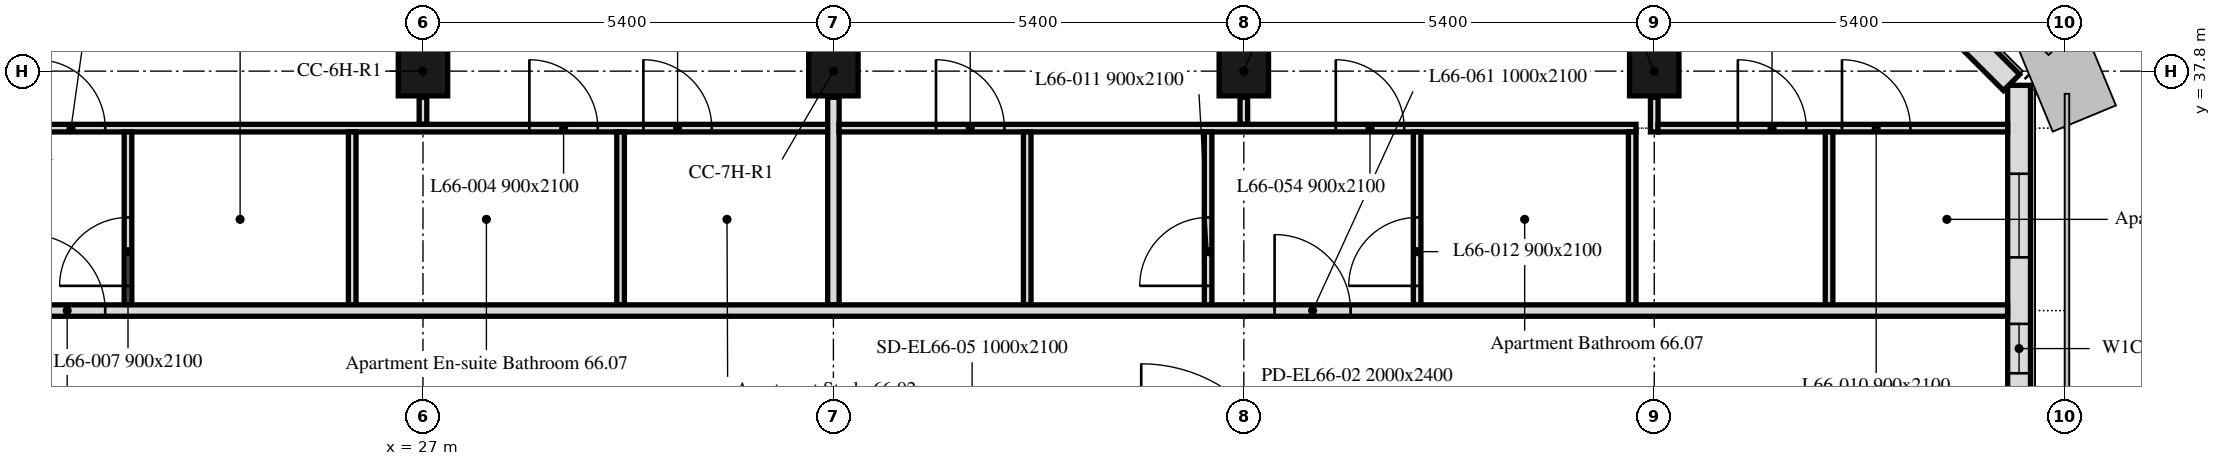
"""IFC4 building model, lengths in metres.
Left out: names, types, materials, properties, quantities, classifications, styles, units other than length and angle.
Written with IfcOpenShell. Run it as: python <this file> out.ifc"""

import sys

from ifc_helpers import new_model, si_unit, direction, frame, frame_2d, origin, origin_2d, place, context, subcontext, project, spatial, rectangle, extrude, element, fill, save


model = new_model("IFC4")
c1 = context("Model", 3, precision=1e-05, world=origin(), true_north=direction((0.0, 1.0)))
c2 = subcontext(c1, "Body", "Model", "MODEL_VIEW")
j1 = project(units=[si_unit("LENGTHUNIT", "METRE"), si_unit("PLANEANGLEUNIT", "RADIAN")], contexts=[c1])
p1 = place(None, origin())
s1 = spatial("IfcSite", under=j1, at=p1, CompositionType="ELEMENT")
p2 = place(p1, origin())
s2 = spatial("IfcBuilding", under=s1, at=p2, CompositionType="ELEMENT")
p3 = place(p2, frame((0.0, 0.0, 271.9)))
s3 = spatial("IfcBuildingStorey", under=s2, at=p3, CompositionType="ELEMENT", Elevation=271.9)
for number, where, z_axis, x_axis in (
    (1, (27.0, 37.8, 0.0), (0.0, 0.0, 1.0), (1.0, 0.0, 0.0)),
    (2, (32.4, 37.8, 0.0), (0.0, 0.0, 1.0), (1.0, 0.0, 0.0)),
    (3, (37.8, 37.8, 0.0), (0.0, 0.0, 1.0), (1.0, 0.0, 0.0)),
    (4, (43.2, 37.8, 0.0), (0.0, 0.0, 1.0), (1.0, 0.0, 0.0)),
):
    element("IfcColumn", number, at=place(p3, frame(where, z_axis=z_axis, x_axis=x_axis)), inside=s3, PredefinedType="COLUMN", context=c2, shape_type="SweptSolid", body=[
        extrude(rectangle(XDim=0.65, YDim=0.65, at=origin_2d()), origin(), (0.0, 0.0, 1.0), 3.0),
    ])
p4 = place(p3, frame((48.0, 5.586, 0.0), z_axis=(0.0, 0.0, 1.0), x_axis=(0.0, 1.0, 0.0)))
e5 = element("IfcWall", 5, at=p4, inside=s3, PredefinedType="SOLIDWALL", context=c2, shape_type="SweptSolid", body=[
    extrude(rectangle(XDim=32.027, YDim=0.3, at=frame_2d((16.014, 0.0))), origin(), (0.0, 0.0, 1.0), 3.0),
])
p5 = place(p4, frame((1.314, 0.0, 0.9)))
e6 = element("IfcOpeningElement", 6, at=p5, cuts=e5, PredefinedType="OPENING", context=c2, shape_type="SweptSolid", body=[
    extrude(rectangle(XDim=1.1, YDim=1.7, at=frame_2d((0.55, 0.85))), frame((0.0, 0.16, 0.0), z_axis=(0.0, -1.0, 0.0), x_axis=(1.0, 0.0, 0.0)), (0.0, 0.0, 1.0), 0.32),
])
p6 = place(p4, frame((2.764, 0.0, 0.9)))
e7 = element("IfcOpeningElement", 7, at=p6, cuts=e5, PredefinedType="OPENING", context=c2, shape_type="SweptSolid", body=[
    extrude(rectangle(XDim=1.1, YDim=1.7, at=frame_2d((0.55, 0.85))), frame((0.0, 0.16, 0.0), z_axis=(0.0, -1.0, 0.0), x_axis=(1.0, 0.0, 0.0)), (0.0, 0.0, 1.0), 0.32),
])
p7 = place(p4, frame((6.564, 0.0, 0.9)))
e8 = element("IfcOpeningElement", 8, at=p7, cuts=e5, PredefinedType="OPENING", context=c2, shape_type="SweptSolid", body=[
    extrude(rectangle(XDim=1.1, YDim=1.7, at=frame_2d((0.55, 0.85))), frame((0.0, 0.16, 0.0), z_axis=(0.0, -1.0, 0.0), x_axis=(1.0, 0.0, 0.0)), (0.0, 0.0, 1.0), 0.32),
])
p8 = place(p4, frame((8.514, 0.0, 0.9)))
e9 = element("IfcOpeningElement", 9, at=p8, cuts=e5, PredefinedType="OPENING", context=c2, shape_type="SweptSolid", body=[
    extrude(rectangle(XDim=1.1, YDim=1.7, at=frame_2d((0.55, 0.85))), frame((0.0, 0.16, 0.0), z_axis=(0.0, -1.0, 0.0), x_axis=(1.0, 0.0, 0.0)), (0.0, 0.0, 1.0), 0.32),
])
p9 = place(p4, frame((11.614, 0.0, 0.9)))
e10 = element("IfcOpeningElement", 10, at=p9, cuts=e5, PredefinedType="OPENING", context=c2, shape_type="SweptSolid", body=[
    extrude(rectangle(XDim=3.4, YDim=1.7, at=frame_2d((1.7, 0.85))), frame((0.0, 0.16, 0.0), z_axis=(0.0, -1.0, 0.0), x_axis=(1.0, 0.0, 0.0)), (0.0, 0.0, 1.0), 0.32),
])
p10 = place(p4, frame((17.364, 0.0, 0.9)))
e11 = element("IfcOpeningElement", 11, at=p10, cuts=e5, PredefinedType="OPENING", context=c2, shape_type="SweptSolid", body=[
    extrude(rectangle(XDim=1.1, YDim=1.7, at=frame_2d((0.55, 0.85))), frame((0.0, 0.16, 0.0), z_axis=(0.0, -1.0, 0.0), x_axis=(1.0, 0.0, 0.0)), (0.0, 0.0, 1.0), 0.32),
])
p11 = place(p4, frame((18.964, 0.0, 0.9)))
e12 = element("IfcOpeningElement", 12, at=p11, cuts=e5, PredefinedType="OPENING", context=c2, shape_type="SweptSolid", body=[
    extrude(rectangle(XDim=1.1, YDim=1.7, at=frame_2d((0.55, 0.85))), frame((0.0, 0.16, 0.0), z_axis=(0.0, -1.0, 0.0), x_axis=(1.0, 0.0, 0.0)), (0.0, 0.0, 1.0), 0.32),
])
p12 = place(p4, frame((22.414, 0.0, 0.9)))
e13 = element("IfcOpeningElement", 13, at=p12, cuts=e5, PredefinedType="OPENING", context=c2, shape_type="SweptSolid", body=[
    extrude(rectangle(XDim=3.4, YDim=1.7, at=frame_2d((1.7, 0.85))), frame((0.0, 0.16, 0.0), z_axis=(0.0, -1.0, 0.0), x_axis=(1.0, 0.0, 0.0)), (0.0, 0.0, 1.0), 0.32),
])
p13 = place(p4, frame((28.239, 0.0, 0.9)))
e14 = element("IfcOpeningElement", 14, at=p13, cuts=e5, PredefinedType="OPENING", context=c2, shape_type="SweptSolid", body=[
    extrude(rectangle(XDim=0.65, YDim=1.7, at=frame_2d((0.325, 0.85))), frame((0.0, 0.16, 0.0), z_axis=(0.0, -1.0, 0.0), x_axis=(1.0, 0.0, 0.0)), (0.0, 0.0, 1.0), 0.32),
])
p14 = place(p4, frame((29.764, 0.0, 0.9)))
e15 = element("IfcOpeningElement", 15, at=p14, cuts=e5, PredefinedType="OPENING", context=c2, shape_type="SweptSolid", body=[
    extrude(rectangle(XDim=1.1, YDim=1.7, at=frame_2d((0.55, 0.85))), frame((0.0, 0.16, 0.0), z_axis=(0.0, -1.0, 0.0), x_axis=(1.0, 0.0, 0.0)), (0.0, 0.0, 1.0), 0.32),
])
p15 = place(p3, frame((47.901, 37.65, 0.0), z_axis=(0.0, 0.0, 1.0), x_axis=(-0.707106781187, 0.707106781187, 0.0)))
e16 = element("IfcWall", 16, at=p15, inside=s3, PredefinedType="SOLIDWALL", context=c2, shape_type="SweptSolid", body=[
    extrude(rectangle(XDim=6.86, YDim=0.3, at=frame_2d((3.43, 0.0))), origin(), (0.0, 0.0, 1.0), 3.0),
])
p16 = place(p15, frame((1.73, 0.0, 0.9)))
e17 = element("IfcOpeningElement", 17, at=p16, cuts=e16, PredefinedType="OPENING", context=c2, shape_type="SweptSolid", body=[
    extrude(rectangle(XDim=3.4, YDim=1.7, at=frame_2d((1.7, 0.85))), frame((0.0, 0.16, 0.0), z_axis=(0.0, -1.0, 0.0), x_axis=(1.0, 0.0, 0.0)), (0.0, 0.0, 1.0), 0.32),
])
p17 = place(p3, frame((27.0, 37.1, 0.0), z_axis=(0.0, 0.0, 1.0), x_axis=(0.0, 1.0, 0.0)))
e18 = element("IfcWall", 18, at=p17, inside=s3, PredefinedType="PARTITIONING", context=c2, shape_type="SweptSolid", body=[
    extrude(rectangle(XDim=0.355, YDim=0.1, at=frame_2d((0.177, 0.0))), origin(), (0.0, 0.0, 1.0), 3.0),
])
p18 = place(p3, frame((16.275, 37.05, 0.0), z_axis=(0.0, 0.0, 1.0), x_axis=(1.0, 0.0, 0.0)))
e19 = element("IfcWall", 19, at=p18, inside=s3, PredefinedType="PARTITIONING", context=c2, shape_type="SweptSolid", body=[
    extrude(rectangle(XDim=16.05, YDim=0.1, at=frame_2d((8.025, 0.0))), origin(), (0.0, 0.0, 1.0), 3.0),
])
p19 = place(p18, frame((1.453, 0.0, 0.0)))
e20 = element("IfcOpeningElement", 20, at=p19, cuts=e19, PredefinedType="OPENING", context=c2, shape_type="SweptSolid", body=[
    extrude(rectangle(XDim=0.9, YDim=2.1, at=frame_2d((0.45, 1.05))), frame((0.0, 0.05, 0.0), z_axis=(0.0, -1.0, 0.0), x_axis=(1.0, 0.0, 0.0)), (0.0, 0.0, 1.0), 0.1),
])
p20 = place(p18, frame((12.125, 0.0, 0.0)))
e21 = element("IfcOpeningElement", 21, at=p20, cuts=e19, PredefinedType="OPENING", context=c2, shape_type="SweptSolid", body=[
    extrude(rectangle(XDim=0.9, YDim=2.1, at=frame_2d((0.45, 1.05))), frame((0.0, 0.05, 0.0), z_axis=(0.0, -1.0, 0.0), x_axis=(1.0, 0.0, 0.0)), (0.0, 0.0, 1.0), 0.1),
])
p21 = place(p18, frame((13.625, 0.0, 0.0)))
e22 = element("IfcOpeningElement", 22, at=p21, cuts=e19, PredefinedType="OPENING", context=c2, shape_type="SweptSolid", body=[
    extrude(rectangle(XDim=0.9, YDim=2.1, at=frame_2d((0.45, 1.05))), frame((0.0, 0.05, 0.0), z_axis=(0.0, -1.0, 0.0), x_axis=(1.0, 0.0, 0.0)), (0.0, 0.0, 1.0), 0.1),
])
p22 = place(p18, frame((5.644, 0.0, 0.0)))
e23 = element("IfcOpeningElement", 23, at=p22, cuts=e19, PredefinedType="OPENING", context=c2, shape_type="SweptSolid", body=[
    extrude(rectangle(XDim=0.9, YDim=2.1, at=frame_2d((0.45, 1.05))), frame((0.0, 0.05, 0.0), z_axis=(0.0, -1.0, 0.0), x_axis=(1.0, 0.0, 0.0)), (0.0, 0.0, 1.0), 0.1),
])
p23 = place(p3, frame((23.119, 34.725, 0.0), z_axis=(0.0, 0.0, 1.0), x_axis=(0.0, 1.0, 0.0)))
e24 = element("IfcWall", 24, at=p23, inside=s3, PredefinedType="PARTITIONING", context=c2, shape_type="SweptSolid", body=[
    extrude(rectangle(XDim=2.275, YDim=0.1, at=frame_2d((1.137, 0.0))), origin(), (0.0, 0.0, 1.0), 3.0),
])
p24 = place(p23, frame((0.25, 0.0, 0.0)))
e25 = element("IfcOpeningElement", 25, at=p24, cuts=e24, PredefinedType="OPENING", context=c2, shape_type="SweptSolid", body=[
    extrude(rectangle(XDim=0.9, YDim=2.1, at=frame_2d((0.45, 1.05))), frame((0.0, 0.05, 0.0), z_axis=(0.0, -1.0, 0.0), x_axis=(1.0, 0.0, 0.0)), (0.0, 0.0, 1.0), 0.1),
])
for number, where, z_axis, x_axis in (
    (26, (26.069, 34.725, 0.0), (0.0, 0.0, 1.0), (0.0, 1.0, 0.0)),
    (27, (29.6, 34.725, 0.0), (0.0, 0.0, 1.0), (0.0, 1.0, 0.0)),
):
    element("IfcWall", number, at=place(p3, frame(where, z_axis=z_axis, x_axis=x_axis)), inside=s3, PredefinedType="PARTITIONING", context=c2, shape_type="SweptSolid", body=[
        extrude(rectangle(XDim=2.275, YDim=0.1, at=frame_2d((1.137, 0.0))), origin(), (0.0, 0.0, 1.0), 3.0),
    ])
p25 = place(p3, frame((32.4, 34.725, 0.0), z_axis=(0.0, 0.0, 1.0), x_axis=(0.0, 1.0, 0.0)))
e28 = element("IfcWall", 28, at=p25, inside=s3, PredefinedType="PARTITIONING", context=c2, shape_type="SweptSolid", body=[
    extrude(rectangle(XDim=2.73, YDim=0.15, at=frame_2d((1.365, 0.0))), origin(), (0.0, 0.0, 1.0), 3.0),
])
p26 = place(p3, frame((37.8, 37.1, 0.0), z_axis=(0.0, 0.0, 1.0), x_axis=(0.0, 1.0, 0.0)))
e29 = element("IfcWall", 29, at=p26, inside=s3, PredefinedType="PARTITIONING", context=c2, shape_type="SweptSolid", body=[
    extrude(rectangle(XDim=0.355, YDim=0.1, at=frame_2d((0.177, 0.0))), origin(), (0.0, 0.0, 1.0), 3.0),
])
p27 = place(p3, frame((32.475, 37.05, 0.0), z_axis=(0.0, 0.0, 1.0), x_axis=(1.0, 0.0, 0.0)))
e30 = element("IfcWall", 30, at=p27, inside=s3, PredefinedType="PARTITIONING", context=c2, shape_type="SweptSolid", body=[
    extrude(rectangle(XDim=10.485, YDim=0.1, at=frame_2d((5.242, 0.0))), origin(), (0.0, 0.0, 1.0), 3.0),
])
p28 = place(p27, frame((1.275, 0.0, 0.0)))
e31 = element("IfcOpeningElement", 31, at=p28, cuts=e30, PredefinedType="OPENING", context=c2, shape_type="SweptSolid", body=[
    extrude(rectangle(XDim=0.9, YDim=2.1, at=frame_2d((0.45, 1.05))), frame((0.0, 0.05, 0.0), z_axis=(0.0, -1.0, 0.0), x_axis=(1.0, 0.0, 0.0)), (0.0, 0.0, 1.0), 0.1),
])
p29 = place(p27, frame((6.535, 0.0, 0.0)))
e32 = element("IfcOpeningElement", 32, at=p29, cuts=e30, PredefinedType="OPENING", context=c2, shape_type="SweptSolid", body=[
    extrude(rectangle(XDim=0.9, YDim=2.1, at=frame_2d((0.45, 1.05))), frame((0.0, 0.05, 0.0), z_axis=(0.0, -1.0, 0.0), x_axis=(1.0, 0.0, 0.0)), (0.0, 0.0, 1.0), 0.1),
])
p30 = place(p3, frame((43.2, 37.0, 0.0), z_axis=(0.0, 0.0, 1.0), x_axis=(0.0, 1.0, 0.0)))
e33 = element("IfcWall", 33, at=p30, inside=s3, PredefinedType="PARTITIONING", context=c2, shape_type="SweptSolid", body=[
    extrude(rectangle(XDim=0.455, YDim=0.1, at=frame_2d((0.228, 0.0))), origin(), (0.0, 0.0, 1.0), 3.0),
])
p31 = place(p3, frame((43.25, 37.05, 0.0), z_axis=(0.0, 0.0, 1.0), x_axis=(1.0, 0.0, 0.0)))
e34 = element("IfcWall", 34, at=p31, inside=s3, PredefinedType="PARTITIONING", context=c2, shape_type="SweptSolid", body=[
    extrude(rectangle(XDim=4.599, YDim=0.1, at=frame_2d((2.3, 0.0))), origin(), (0.0, 0.0, 1.0), 3.0),
])
p32 = place(p31, frame((1.05, 0.0, 0.0)))
e35 = element("IfcOpeningElement", 35, at=p32, cuts=e34, PredefinedType="OPENING", context=c2, shape_type="SweptSolid", body=[
    extrude(rectangle(XDim=0.9, YDim=2.1, at=frame_2d((0.45, 1.05))), frame((0.0, 0.05, 0.0), z_axis=(0.0, -1.0, 0.0), x_axis=(1.0, 0.0, 0.0)), (0.0, 0.0, 1.0), 0.1),
])
p33 = place(p31, frame((2.42, 0.0, 0.0)))
e36 = element("IfcOpeningElement", 36, at=p33, cuts=e34, PredefinedType="OPENING", context=c2, shape_type="SweptSolid", body=[
    extrude(rectangle(XDim=0.9, YDim=2.1, at=frame_2d((0.45, 1.05))), frame((0.0, 0.05, 0.0), z_axis=(0.0, -1.0, 0.0), x_axis=(1.0, 0.0, 0.0)), (0.0, 0.0, 1.0), 0.1),
])
p34 = place(p3, frame((34.95, 34.725, 0.0), z_axis=(0.0, 0.0, 1.0), x_axis=(0.0, 1.0, 0.0)))
e37 = element("IfcWall", 37, at=p34, inside=s3, PredefinedType="PARTITIONING", context=c2, shape_type="SweptSolid", body=[
    extrude(rectangle(XDim=2.275, YDim=0.1, at=frame_2d((1.137, 0.0))), origin(), (0.0, 0.0, 1.0), 3.0),
])
p35 = place(p3, frame((37.33, 34.725, 0.0), z_axis=(0.0, 0.0, 1.0), x_axis=(0.0, 1.0, 0.0)))
e38 = element("IfcWall", 38, at=p35, inside=s3, PredefinedType="PARTITIONING", context=c2, shape_type="SweptSolid", body=[
    extrude(rectangle(XDim=2.275, YDim=0.1, at=frame_2d((1.137, 0.0))), origin(), (0.0, 0.0, 1.0), 3.0),
])
p36 = place(p35, frame((0.25, 0.0, 0.0)))
e39 = element("IfcOpeningElement", 39, at=p36, cuts=e38, PredefinedType="OPENING", context=c2, shape_type="SweptSolid", body=[
    extrude(rectangle(XDim=0.9, YDim=2.1, at=frame_2d((0.45, 1.05))), frame((0.0, 0.05, 0.0), z_axis=(0.0, -1.0, 0.0), x_axis=(1.0, 0.0, 0.0)), (0.0, 0.0, 1.0), 0.1),
])
p37 = place(p3, frame((40.08, 34.725, 0.0), z_axis=(0.0, 0.0, 1.0), x_axis=(0.0, 1.0, 0.0)))
e40 = element("IfcWall", 40, at=p37, inside=s3, PredefinedType="PARTITIONING", context=c2, shape_type="SweptSolid", body=[
    extrude(rectangle(XDim=2.275, YDim=0.1, at=frame_2d((1.137, 0.0))), origin(), (0.0, 0.0, 1.0), 3.0),
])
p38 = place(p37, frame((0.25, 0.0, 0.0)))
e41 = element("IfcOpeningElement", 41, at=p38, cuts=e40, PredefinedType="OPENING", context=c2, shape_type="SweptSolid", body=[
    extrude(rectangle(XDim=0.9, YDim=2.1, at=frame_2d((0.45, 1.05))), frame((0.0, 0.05, 0.0), z_axis=(0.0, -1.0, 0.0), x_axis=(1.0, 0.0, 0.0)), (0.0, 0.0, 1.0), 0.1),
])
for number, where, z_axis, x_axis in (
    (42, (42.91, 34.725, 0.0), (0.0, 0.0, 1.0), (0.0, 1.0, 0.0)),
    (43, (45.5, 34.725, 0.0), (0.0, 0.0, 1.0), (0.0, 1.0, 0.0)),
):
    element("IfcWall", number, at=place(p3, frame(where, z_axis=z_axis, x_axis=x_axis)), inside=s3, PredefinedType="PARTITIONING", context=c2, shape_type="SweptSolid", body=[
        extrude(rectangle(XDim=2.275, YDim=0.1, at=frame_2d((1.137, 0.0))), origin(), (0.0, 0.0, 1.0), 3.0),
    ])
p39 = place(p3, frame((6.151, 34.65, 0.0), z_axis=(0.0, 0.0, 1.0), x_axis=(1.0, 0.0, 0.0)))
e44 = element("IfcWall", 44, at=p39, inside=s3, PredefinedType="PARTITIONING", context=c2, shape_type="SweptSolid", body=[
    extrude(rectangle(XDim=41.698, YDim=0.15, at=frame_2d((20.849, 0.0))), origin(), (0.0, 0.0, 1.0), 3.0),
])
p40 = place(p39, frame((2.969, 0.0, 0.0)))
e45 = element("IfcOpeningElement", 45, at=p40, cuts=e44, PredefinedType="OPENING", context=c2, shape_type="SweptSolid", body=[
    extrude(rectangle(XDim=1.0, YDim=2.1, at=frame_2d((0.5, 1.05))), frame((0.0, 0.075, 0.0), z_axis=(0.0, -1.0, 0.0), x_axis=(1.0, 0.0, 0.0)), (0.0, 0.0, 1.0), 0.15),
])
p41 = place(p39, frame((15.668, 0.0, 0.0)))
e46 = element("IfcOpeningElement", 46, at=p41, cuts=e44, PredefinedType="OPENING", context=c2, shape_type="SweptSolid", body=[
    extrude(rectangle(XDim=1.0, YDim=2.1, at=frame_2d((0.5, 1.05))), frame((0.0, 0.075, 0.0), z_axis=(0.0, -1.0, 0.0), x_axis=(1.0, 0.0, 0.0)), (0.0, 0.0, 1.0), 0.15),
])
p42 = place(p39, frame((32.054, 0.0, 0.0)))
e47 = element("IfcOpeningElement", 47, at=p42, cuts=e44, PredefinedType="OPENING", context=c2, shape_type="SweptSolid", body=[
    extrude(rectangle(XDim=1.0, YDim=2.1, at=frame_2d((0.5, 1.05))), frame((0.0, 0.075, 0.0), z_axis=(0.0, -1.0, 0.0), x_axis=(1.0, 0.0, 0.0)), (0.0, 0.0, 1.0), 0.15),
])
p43 = place(p13, origin())
e48 = element("IfcWindow", 48, at=p43, inside=s3, PartitioningType="SINGLE_PANEL", PredefinedType="WINDOW", context=c2, shape_type="SweptSolid", body=[
    extrude(rectangle(XDim=0.65, YDim=1.7, at=frame_2d((0.325, 0.85))), frame((0.0, 0.03, 0.0), z_axis=(0.0, -1.0, 0.0), x_axis=(1.0, 0.0, 0.0)), (0.0, 0.0, 1.0), 0.06),
])
fill(e14, e48)
p44 = place(p14, origin())
e49 = element("IfcWindow", 49, at=p44, inside=s3, PartitioningType="SINGLE_PANEL", PredefinedType="WINDOW", context=c2, shape_type="SweptSolid", body=[
    extrude(rectangle(XDim=1.1, YDim=1.7, at=frame_2d((0.55, 0.85))), frame((0.0, 0.03, 0.0), z_axis=(0.0, -1.0, 0.0), x_axis=(1.0, 0.0, 0.0)), (0.0, 0.0, 1.0), 0.06),
])
fill(e15, e49)
p45 = place(p20, origin())
e50 = element("IfcDoor", 50, at=p45, inside=s3, OperationType="SINGLE_SWING_LEFT", PredefinedType="DOOR", context=c2, shape_type="SweptSolid", body=[
    extrude(rectangle(XDim=0.9, YDim=2.1, at=frame_2d((0.45, 1.05))), frame((0.0, 0.025, 0.0), z_axis=(0.0, -1.0, 0.0), x_axis=(1.0, 0.0, 0.0)), (0.0, 0.0, 1.0), 0.05),
])
fill(e21, e50)
p46 = place(p21, origin())
e51 = element("IfcDoor", 51, at=p46, inside=s3, OperationType="SINGLE_SWING_RIGHT", PredefinedType="DOOR", context=c2, shape_type="SweptSolid", body=[
    extrude(rectangle(XDim=0.9, YDim=2.1, at=frame_2d((0.45, 1.05))), frame((0.0, 0.025, 0.0), z_axis=(0.0, -1.0, 0.0), x_axis=(1.0, 0.0, 0.0)), (0.0, 0.0, 1.0), 0.05),
])
fill(e22, e51)
p47 = place(p24, origin())
e52 = element("IfcDoor", 52, at=p47, inside=s3, OperationType="SINGLE_SWING_LEFT", PredefinedType="DOOR", context=c2, shape_type="SweptSolid", body=[
    extrude(rectangle(XDim=0.9, YDim=2.1, at=frame_2d((0.45, 1.05))), frame((0.0, 0.025, 0.0), z_axis=(0.0, -1.0, 0.0), x_axis=(1.0, 0.0, 0.0)), (0.0, 0.0, 1.0), 0.05),
])
fill(e25, e52)
p48 = place(p28, origin())
e53 = element("IfcDoor", 53, at=p48, inside=s3, OperationType="SINGLE_SWING_RIGHT", PredefinedType="DOOR", context=c2, shape_type="SweptSolid", body=[
    extrude(rectangle(XDim=0.9, YDim=2.1, at=frame_2d((0.45, 1.05))), frame((0.0, 0.025, 0.0), z_axis=(0.0, -1.0, 0.0), x_axis=(1.0, 0.0, 0.0)), (0.0, 0.0, 1.0), 0.05),
])
fill(e31, e53)
p49 = place(p32, origin())
e54 = element("IfcDoor", 54, at=p49, inside=s3, OperationType="SINGLE_SWING_LEFT", PredefinedType="DOOR", context=c2, shape_type="SweptSolid", body=[
    extrude(rectangle(XDim=0.9, YDim=2.1, at=frame_2d((0.45, 1.05))), frame((0.0, 0.025, 0.0), z_axis=(0.0, -1.0, 0.0), x_axis=(1.0, 0.0, 0.0)), (0.0, 0.0, 1.0), 0.05),
])
fill(e35, e54)
p50 = place(p33, origin())
e55 = element("IfcDoor", 55, at=p50, inside=s3, OperationType="SINGLE_SWING_RIGHT", PredefinedType="DOOR", context=c2, shape_type="SweptSolid", body=[
    extrude(rectangle(XDim=0.9, YDim=2.1, at=frame_2d((0.45, 1.05))), frame((0.0, 0.025, 0.0), z_axis=(0.0, -1.0, 0.0), x_axis=(1.0, 0.0, 0.0)), (0.0, 0.0, 1.0), 0.05),
])
fill(e36, e55)
p51 = place(p36, origin())
e56 = element("IfcDoor", 56, at=p51, inside=s3, OperationType="SINGLE_SWING_LEFT", PredefinedType="DOOR", context=c2, shape_type="SweptSolid", body=[
    extrude(rectangle(XDim=0.9, YDim=2.1, at=frame_2d((0.45, 1.05))), frame((0.0, 0.025, 0.0), z_axis=(0.0, -1.0, 0.0), x_axis=(1.0, 0.0, 0.0)), (0.0, 0.0, 1.0), 0.05),
])
fill(e39, e56)
p52 = place(p38, origin())
e57 = element("IfcDoor", 57, at=p52, inside=s3, OperationType="SINGLE_SWING_RIGHT", PredefinedType="DOOR", context=c2, shape_type="SweptSolid", body=[
    extrude(rectangle(XDim=0.9, YDim=2.1, at=frame_2d((0.45, 1.05))), frame((0.0, 0.025, 0.0), z_axis=(0.0, -1.0, 0.0), x_axis=(1.0, 0.0, 0.0)), (0.0, 0.0, 1.0), 0.05),
])
fill(e41, e57)
p53 = place(p22, origin())
e58 = element("IfcDoor", 58, at=p53, inside=s3, OperationType="SINGLE_SWING_RIGHT", PredefinedType="DOOR", context=c2, shape_type="SweptSolid", body=[
    extrude(rectangle(XDim=0.9, YDim=2.1, at=frame_2d((0.45, 1.05))), frame((0.0, 0.025, 0.0), z_axis=(0.0, -1.0, 0.0), x_axis=(1.0, 0.0, 0.0)), (0.0, 0.0, 1.0), 0.05),
])
fill(e23, e58)
p54 = place(p29, origin())
e59 = element("IfcDoor", 59, at=p54, inside=s3, OperationType="SINGLE_SWING_RIGHT", PredefinedType="DOOR", context=c2, shape_type="SweptSolid", body=[
    extrude(rectangle(XDim=0.9, YDim=2.1, at=frame_2d((0.45, 1.05))), frame((0.0, 0.025, 0.0), z_axis=(0.0, -1.0, 0.0), x_axis=(1.0, 0.0, 0.0)), (0.0, 0.0, 1.0), 0.05),
])
fill(e32, e59)
p55 = place(p41, origin())
e60 = element("IfcDoor", 60, at=p55, inside=s3, OperationType="SINGLE_SWING_LEFT", PredefinedType="DOOR", context=c2, shape_type="SweptSolid", body=[
    extrude(rectangle(XDim=1.0, YDim=2.1, at=frame_2d((0.5, 1.05))), frame((0.0, 0.025, 0.0), z_axis=(0.0, -1.0, 0.0), x_axis=(1.0, 0.0, 0.0)), (0.0, 0.0, 1.0), 0.05),
])
fill(e46, e60)
p56 = place(p42, origin())
e61 = element("IfcDoor", 61, at=p56, inside=s3, OperationType="SINGLE_SWING_RIGHT", PredefinedType="DOOR", context=c2, shape_type="SweptSolid", body=[
    extrude(rectangle(XDim=1.0, YDim=2.1, at=frame_2d((0.5, 1.05))), frame((0.0, 0.025, 0.0), z_axis=(0.0, -1.0, 0.0), x_axis=(1.0, 0.0, 0.0)), (0.0, 0.0, 1.0), 0.05),
])
fill(e47, e61)
save(model, sys.argv[1])
